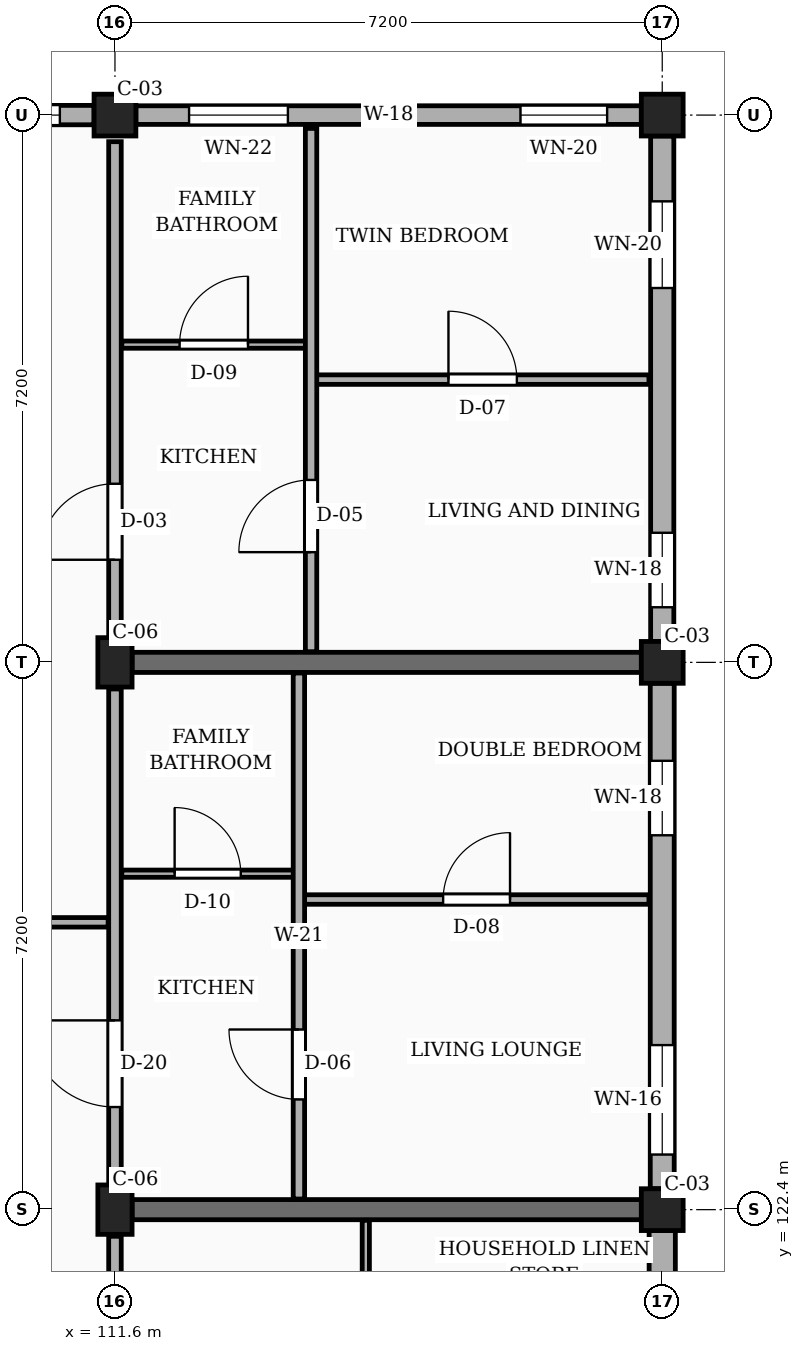
"""IFC4 building model, lengths in metres.
Left out: names, types, materials, properties, quantities, classifications, styles, units other than length and angle.
Written with IfcOpenShell. Run it as: python <this file> out.ifc"""

import sys

from ifc_helpers import new_model, si_unit, direction, frame, frame_2d, origin, origin_2d, place, context, subcontext, project, spatial, rectangle, extrude, element, fill, save


model = new_model("IFC4")
c1 = context("Model", 3, precision=1e-05, world=origin(), true_north=direction((0.0, 1.0)))
c2 = subcontext(c1, "Body", "Model", "MODEL_VIEW")
j1 = project(units=[si_unit("LENGTHUNIT", "METRE"), si_unit("PLANEANGLEUNIT", "RADIAN")], contexts=[c1])
p1 = place(None, origin())
s1 = spatial("IfcSite", under=j1, at=p1, CompositionType="ELEMENT")
p2 = place(p1, origin())
s2 = spatial("IfcBuilding", under=s1, at=p2, CompositionType="ELEMENT")
p3 = place(p2, frame((0.0, 0.0, 10.8)))
s3 = spatial("IfcBuildingStorey", under=s2, at=p3, CompositionType="ELEMENT", Elevation=10.8)
for number, where, z_axis, x_axis in (
    (1, (111.6, 122.4, 0.0), (0.0, 0.0, 1.0), (1.0, 0.0, 0.0)),
    (2, (111.6, 129.6, 0.0), (0.0, 0.0, 1.0), (1.0, 0.0, 0.0)),
):
    element("IfcColumn", number, at=place(p3, frame(where, z_axis=z_axis, x_axis=x_axis)), inside=s3, PredefinedType="COLUMN", context=c2, shape_type="SweptSolid", body=[
        extrude(rectangle(XDim=0.45, YDim=0.65, at=origin_2d()), origin(), (0.0, 0.0, 1.0), 3.15),
    ])
for number, where, z_axis, x_axis in (
    (3, (111.6, 136.8, 0.0), (0.0, 0.0, 1.0), (1.0, 0.0, 0.0)),
    (4, (118.8, 122.4, 0.0), (0.0, 0.0, 1.0), (1.0, 0.0, 0.0)),
    (5, (118.8, 129.6, 0.0), (0.0, 0.0, 1.0), (1.0, 0.0, 0.0)),
    (6, (118.8, 136.8, 0.0), (0.0, 0.0, 1.0), (1.0, 0.0, 0.0)),
):
    element("IfcColumn", number, at=place(p3, frame(where, z_axis=z_axis, x_axis=x_axis)), inside=s3, PredefinedType="COLUMN", context=c2, shape_type="SweptSolid", body=[
        extrude(rectangle(XDim=0.55, YDim=0.55, at=origin_2d()), origin(), (0.0, 0.0, 1.0), 3.15),
    ])
for number, where, z_axis, x_axis in (
    (7, (111.825, 122.4, 0.0), (0.0, 0.0, 1.0), (1.0, 0.0, 0.0)),
    (8, (111.825, 129.6, 0.0), (0.0, 0.0, 1.0), (1.0, 0.0, 0.0)),
):
    element("IfcWall", number, at=place(p3, frame(where, z_axis=z_axis, x_axis=x_axis)), inside=s3, PredefinedType="SOLIDWALL", context=c2, shape_type="SweptSolid", body=[
        extrude(rectangle(XDim=6.7, YDim=0.265, at=frame_2d((3.35, 0.0))), origin(), (0.0, 0.0, 1.0), 2.19),
    ])
p4 = place(p3, frame((118.8, 115.475, 0.0), z_axis=(0.0, 0.0, 1.0), x_axis=(0.0, 1.0, 0.0)))
e9 = element("IfcWall", 9, at=p4, inside=s3, PredefinedType="SOLIDWALL", context=c2, shape_type="SweptSolid", body=[
    extrude(rectangle(XDim=6.65, YDim=0.345, at=frame_2d((3.325, 0.0))), origin(), (0.0, 0.0, 1.0), 2.46),
])
p5 = place(p4, frame((0.45, 0.0, 0.78)))
e10 = element("IfcOpeningElement", 10, at=p5, cuts=e9, PredefinedType="OPENING", context=c2, shape_type="SweptSolid", body=[
    extrude(rectangle(XDim=1.28, YDim=1.26, at=frame_2d((0.64, 0.63))), frame((0.0, 0.183, 0.0), z_axis=(0.0, -1.0, 0.0), x_axis=(1.0, 0.0, 0.0)), (0.0, 0.0, 1.0), 0.365),
])
p6 = place(p4, frame((4.65, 0.0, 0.78)))
e11 = element("IfcOpeningElement", 11, at=p6, cuts=e9, PredefinedType="OPENING", context=c2, shape_type="SweptSolid", body=[
    extrude(rectangle(XDim=1.44, YDim=1.26, at=frame_2d((0.72, 0.63))), frame((0.0, 0.183, 0.0), z_axis=(0.0, -1.0, 0.0), x_axis=(1.0, 0.0, 0.0)), (0.0, 0.0, 1.0), 0.365),
])
p7 = place(p3, frame((118.8, 122.675, 0.0), z_axis=(0.0, 0.0, 1.0), x_axis=(0.0, 1.0, 0.0)))
e12 = element("IfcWall", 12, at=p7, inside=s3, PredefinedType="SOLIDWALL", context=c2, shape_type="SweptSolid", body=[
    extrude(rectangle(XDim=6.65, YDim=0.315, at=frame_2d((3.325, 0.0))), origin(), (0.0, 0.0, 1.0), 2.46),
])
p8 = place(p7, frame((0.45, 0.0, 0.78)))
e13 = element("IfcOpeningElement", 13, at=p8, cuts=e12, PredefinedType="OPENING", context=c2, shape_type="SweptSolid", body=[
    extrude(rectangle(XDim=1.44, YDim=1.26, at=frame_2d((0.72, 0.63))), frame((0.0, 0.167, 0.0), z_axis=(0.0, -1.0, 0.0), x_axis=(1.0, 0.0, 0.0)), (0.0, 0.0, 1.0), 0.335),
])
p9 = place(p7, frame((4.65, 0.0, 0.78)))
e14 = element("IfcOpeningElement", 14, at=p9, cuts=e12, PredefinedType="OPENING", context=c2, shape_type="SweptSolid", body=[
    extrude(rectangle(XDim=0.98, YDim=1.36, at=frame_2d((0.49, 0.68))), frame((0.0, 0.167, 0.0), z_axis=(0.0, -1.0, 0.0), x_axis=(1.0, 0.0, 0.0)), (0.0, 0.0, 1.0), 0.335),
])
p10 = place(p3, frame((118.8, 129.875, 0.0), z_axis=(0.0, 0.0, 1.0), x_axis=(0.0, 1.0, 0.0)))
e15 = element("IfcWall", 15, at=p10, inside=s3, PredefinedType="SOLIDWALL", context=c2, shape_type="SweptSolid", body=[
    extrude(rectangle(XDim=6.65, YDim=0.305, at=frame_2d((3.325, 0.0))), origin(), (0.0, 0.0, 1.0), 2.46),
])
p11 = place(p10, frame((0.45, 0.0, 0.78)))
e16 = element("IfcOpeningElement", 16, at=p11, cuts=e15, PredefinedType="OPENING", context=c2, shape_type="SweptSolid", body=[
    extrude(rectangle(XDim=0.98, YDim=1.36, at=frame_2d((0.49, 0.68))), frame((0.0, 0.163, 0.0), z_axis=(0.0, -1.0, 0.0), x_axis=(1.0, 0.0, 0.0)), (0.0, 0.0, 1.0), 0.325),
])
p12 = place(p10, frame((4.65, 0.0, 0.78)))
e17 = element("IfcOpeningElement", 17, at=p12, cuts=e15, PredefinedType="OPENING", context=c2, shape_type="SweptSolid", body=[
    extrude(rectangle(XDim=1.14, YDim=1.36, at=frame_2d((0.57, 0.68))), frame((0.0, 0.163, 0.0), z_axis=(0.0, -1.0, 0.0), x_axis=(1.0, 0.0, 0.0)), (0.0, 0.0, 1.0), 0.325),
])
p13 = place(p3, frame((118.525, 136.8, 0.0), z_axis=(0.0, 0.0, 1.0), x_axis=(-1.0, 0.0, 0.0)))
e18 = element("IfcWall", 18, at=p13, inside=s3, PredefinedType="SOLIDWALL", context=c2, shape_type="SweptSolid", body=[
    extrude(rectangle(XDim=6.65, YDim=0.245, at=frame_2d((3.325, 0.0))), origin(), (0.0, 0.0, 1.0), 2.46),
])
p14 = place(p13, frame((0.45, 0.0, 0.78)))
e19 = element("IfcOpeningElement", 19, at=p14, cuts=e18, PredefinedType="OPENING", context=c2, shape_type="SweptSolid", body=[
    extrude(rectangle(XDim=1.14, YDim=1.36, at=frame_2d((0.57, 0.68))), frame((0.0, 0.133, 0.0), z_axis=(0.0, -1.0, 0.0), x_axis=(1.0, 0.0, 0.0)), (0.0, 0.0, 1.0), 0.265),
])
p15 = place(p13, frame((4.65, 0.0, 0.78)))
e20 = element("IfcOpeningElement", 20, at=p15, cuts=e18, PredefinedType="OPENING", context=c2, shape_type="SweptSolid", body=[
    extrude(rectangle(XDim=1.3, YDim=1.36, at=frame_2d((0.65, 0.68))), frame((0.0, 0.133, 0.0), z_axis=(0.0, -1.0, 0.0), x_axis=(1.0, 0.0, 0.0)), (0.0, 0.0, 1.0), 0.265),
])
p16 = place(p3, frame((111.325, 136.8, 0.0), z_axis=(0.0, 0.0, 1.0), x_axis=(-1.0, 0.0, 0.0)))
e21 = element("IfcWall", 21, at=p16, inside=s3, PredefinedType="SOLIDWALL", context=c2, shape_type="SweptSolid", body=[
    extrude(rectangle(XDim=6.65, YDim=0.255, at=frame_2d((3.325, 0.0))), origin(), (0.0, 0.0, 1.0), 2.46),
])
p17 = place(p16, frame((0.45, 0.0, 0.78)))
e22 = element("IfcOpeningElement", 22, at=p17, cuts=e21, PredefinedType="OPENING", context=c2, shape_type="SweptSolid", body=[
    extrude(rectangle(XDim=1.3, YDim=1.36, at=frame_2d((0.65, 0.68))), frame((0.0, 0.137, 0.0), z_axis=(0.0, -1.0, 0.0), x_axis=(1.0, 0.0, 0.0)), (0.0, 0.0, 1.0), 0.275),
])
p18 = place(p16, frame((4.65, 0.0, 0.78)))
e23 = element("IfcOpeningElement", 23, at=p18, cuts=e21, PredefinedType="OPENING", context=c2, shape_type="SweptSolid", body=[
    extrude(rectangle(XDim=1.46, YDim=1.36, at=frame_2d((0.73, 0.68))), frame((0.0, 0.137, 0.0), z_axis=(0.0, -1.0, 0.0), x_axis=(1.0, 0.0, 0.0)), (0.0, 0.0, 1.0), 0.275),
])
p19 = place(p3, frame((111.6, 115.55, 0.0), z_axis=(0.0, 0.0, 1.0), x_axis=(0.0, 1.0, 0.0)))
e24 = element("IfcWall", 24, at=p19, inside=s3, PredefinedType="PARTITIONING", context=c2, shape_type="SweptSolid", body=[
    extrude(rectangle(XDim=6.5, YDim=0.165, at=frame_2d((3.25, 0.0))), origin(), (0.0, 0.0, 1.0), 2.24),
])
p20 = place(p19, frame((1.1, 0.0, 0.0)))
e25 = element("IfcOpeningElement", 25, at=p20, cuts=e24, PredefinedType="OPENING", context=c2, shape_type="SweptSolid", body=[
    extrude(rectangle(XDim=0.94, YDim=2.12, at=frame_2d((0.47, 1.06))), frame((0.0, 0.093, 0.0), z_axis=(0.0, -1.0, 0.0), x_axis=(1.0, 0.0, 0.0)), (0.0, 0.0, 1.0), 0.185),
])
p21 = place(p3, frame((111.6, 122.75, 0.0), z_axis=(0.0, 0.0, 1.0), x_axis=(0.0, 1.0, 0.0)))
e26 = element("IfcWall", 26, at=p21, inside=s3, PredefinedType="PARTITIONING", context=c2, shape_type="SweptSolid", body=[
    extrude(rectangle(XDim=6.5, YDim=0.165, at=frame_2d((3.25, 0.0))), origin(), (0.0, 0.0, 1.0), 2.24),
])
p22 = place(p21, frame((1.0, 0.0, 0.0)))
e27 = element("IfcOpeningElement", 27, at=p22, cuts=e26, PredefinedType="OPENING", context=c2, shape_type="SweptSolid", body=[
    extrude(rectangle(XDim=1.14, YDim=2.18, at=frame_2d((0.57, 1.09))), frame((0.0, 0.093, 0.0), z_axis=(0.0, -1.0, 0.0), x_axis=(1.0, 0.0, 0.0)), (0.0, 0.0, 1.0), 0.185),
])
p23 = place(p3, frame((111.6, 129.95, 0.0), z_axis=(0.0, 0.0, 1.0), x_axis=(0.0, 1.0, 0.0)))
e28 = element("IfcWall", 28, at=p23, inside=s3, PredefinedType="PARTITIONING", context=c2, shape_type="SweptSolid", body=[
    extrude(rectangle(XDim=6.5, YDim=0.165, at=frame_2d((3.25, 0.0))), origin(), (0.0, 0.0, 1.0), 2.24),
])
p24 = place(p23, frame((1.0, 0.0, 0.0)))
e29 = element("IfcOpeningElement", 29, at=p24, cuts=e28, PredefinedType="OPENING", context=c2, shape_type="SweptSolid", body=[
    extrude(rectangle(XDim=1.0, YDim=2.15, at=frame_2d((0.5, 1.075))), frame((0.0, 0.093, 0.0), z_axis=(0.0, -1.0, 0.0), x_axis=(1.0, 0.0, 0.0)), (0.0, 0.0, 1.0), 0.185),
])
p25 = place(p3, frame((114.9, 119.07, 0.0), z_axis=(0.0, 0.0, 1.0), x_axis=(0.0, 1.0, 0.0)))
e30 = element("IfcWall", 30, at=p25, inside=s3, PredefinedType="PARTITIONING", context=c2, shape_type="SweptSolid", body=[
    extrude(rectangle(XDim=3.19, YDim=0.095, at=frame_2d((1.595, 0.0))), origin(), (0.0, 0.0, 1.0), 2.325),
])
p26 = place(p3, frame((104.49, 126.18, 0.0), z_axis=(0.0, 0.0, 1.0), x_axis=(1.0, 0.0, 0.0)))
e31 = element("IfcWall", 31, at=p26, inside=s3, PredefinedType="PARTITIONING", context=c2, shape_type="SweptSolid", body=[
    extrude(rectangle(XDim=7.02, YDim=0.125, at=frame_2d((3.51, 0.0))), origin(), (0.0, 0.0, 1.0), 2.325),
])
p27 = place(p26, frame((2.85, 0.0, 0.0)))
e32 = element("IfcOpeningElement", 32, at=p27, cuts=e31, PredefinedType="OPENING", context=c2, shape_type="SweptSolid", body=[
    extrude(rectangle(XDim=1.02, YDim=2.15, at=frame_2d((0.51, 1.075))), frame((0.0, 0.073, 0.0), z_axis=(0.0, -1.0, 0.0), x_axis=(1.0, 0.0, 0.0)), (0.0, 0.0, 1.0), 0.145),
])
p28 = place(p3, frame((114.09, 126.48, 0.0), z_axis=(0.0, 0.0, 1.0), x_axis=(1.0, 0.0, 0.0)))
e33 = element("IfcWall", 33, at=p28, inside=s3, PredefinedType="PARTITIONING", context=c2, shape_type="SweptSolid", body=[
    extrude(rectangle(XDim=4.535, YDim=0.125, at=frame_2d((2.268, 0.0))), origin(), (0.0, 0.0, 1.0), 2.325),
])
p29 = place(p28, frame((1.827, 0.0, 0.0)))
e34 = element("IfcOpeningElement", 34, at=p29, cuts=e33, PredefinedType="OPENING", context=c2, shape_type="SweptSolid", body=[
    extrude(rectangle(XDim=0.88, YDim=2.08, at=frame_2d((0.44, 1.04))), frame((0.0, 0.073, 0.0), z_axis=(0.0, -1.0, 0.0), x_axis=(1.0, 0.0, 0.0)), (0.0, 0.0, 1.0), 0.145),
])
p30 = place(p3, frame((111.69, 126.82, 0.0), z_axis=(0.0, 0.0, 1.0), x_axis=(1.0, 0.0, 0.0)))
e35 = element("IfcWall", 35, at=p30, inside=s3, PredefinedType="PARTITIONING", context=c2, shape_type="SweptSolid", body=[
    extrude(rectangle(XDim=2.26, YDim=0.095, at=frame_2d((1.13, 0.0))), origin(), (0.0, 0.0, 1.0), 2.325),
])
p31 = place(p30, frame((0.695, 0.0, 0.0)))
e36 = element("IfcOpeningElement", 36, at=p31, cuts=e35, PredefinedType="OPENING", context=c2, shape_type="SweptSolid", body=[
    extrude(rectangle(XDim=0.87, YDim=2.05, at=frame_2d((0.435, 1.025))), frame((0.0, 0.058, 0.0), z_axis=(0.0, -1.0, 0.0), x_axis=(1.0, 0.0, 0.0)), (0.0, 0.0, 1.0), 0.115),
])
p32 = place(p3, frame((114.02, 122.54, 0.0), z_axis=(0.0, 0.0, 1.0), x_axis=(0.0, 1.0, 0.0)))
e37 = element("IfcWall", 37, at=p32, inside=s3, PredefinedType="PARTITIONING", context=c2, shape_type="SweptSolid", body=[
    extrude(rectangle(XDim=6.92, YDim=0.15, at=frame_2d((3.46, 0.0))), origin(), (0.0, 0.0, 1.0), 2.325),
])
p33 = place(p32, frame((1.31, 0.0, 0.0)))
e38 = element("IfcOpeningElement", 38, at=p33, cuts=e37, PredefinedType="OPENING", context=c2, shape_type="SweptSolid", body=[
    extrude(rectangle(XDim=0.92, YDim=2.1, at=frame_2d((0.46, 1.05))), frame((0.0, 0.085, 0.0), z_axis=(0.0, -1.0, 0.0), x_axis=(1.0, 0.0, 0.0)), (0.0, 0.0, 1.0), 0.17),
])
p34 = place(p3, frame((114.25, 133.32, 0.0), z_axis=(0.0, 0.0, 1.0), x_axis=(1.0, 0.0, 0.0)))
e39 = element("IfcWall", 39, at=p34, inside=s3, PredefinedType="PARTITIONING", context=c2, shape_type="SweptSolid", body=[
    extrude(rectangle(XDim=4.375, YDim=0.125, at=frame_2d((2.188, 0.0))), origin(), (0.0, 0.0, 1.0), 2.325),
])
p35 = place(p34, frame((1.738, 0.0, 0.0)))
e40 = element("IfcOpeningElement", 40, at=p35, cuts=e39, PredefinedType="OPENING", context=c2, shape_type="SweptSolid", body=[
    extrude(rectangle(XDim=0.9, YDim=2.1, at=frame_2d((0.45, 1.05))), frame((0.0, 0.073, 0.0), z_axis=(0.0, -1.0, 0.0), x_axis=(1.0, 0.0, 0.0)), (0.0, 0.0, 1.0), 0.145),
])
p36 = place(p3, frame((111.69, 133.78, 0.0), z_axis=(0.0, 0.0, 1.0), x_axis=(1.0, 0.0, 0.0)))
e41 = element("IfcWall", 41, at=p36, inside=s3, PredefinedType="PARTITIONING", context=c2, shape_type="SweptSolid", body=[
    extrude(rectangle(XDim=2.42, YDim=0.095, at=frame_2d((1.21, 0.0))), origin(), (0.0, 0.0, 1.0), 2.325),
])
p37 = place(p36, frame((0.76, 0.0, 0.0)))
e42 = element("IfcOpeningElement", 42, at=p37, cuts=e41, PredefinedType="OPENING", context=c2, shape_type="SweptSolid", body=[
    extrude(rectangle(XDim=0.9, YDim=2.05, at=frame_2d((0.45, 1.025))), frame((0.0, 0.058, 0.0), z_axis=(0.0, -1.0, 0.0), x_axis=(1.0, 0.0, 0.0)), (0.0, 0.0, 1.0), 0.115),
])
p38 = place(p3, frame((114.18, 129.74, 0.0), z_axis=(0.0, 0.0, 1.0), x_axis=(0.0, 1.0, 0.0)))
e43 = element("IfcWall", 43, at=p38, inside=s3, PredefinedType="PARTITIONING", context=c2, shape_type="SweptSolid", body=[
    extrude(rectangle(XDim=6.885, YDim=0.15, at=frame_2d((3.442, 0.0))), origin(), (0.0, 0.0, 1.0), 2.325),
])
p39 = place(p38, frame((1.31, 0.0, 0.0)))
e44 = element("IfcOpeningElement", 44, at=p39, cuts=e43, PredefinedType="OPENING", context=c2, shape_type="SweptSolid", body=[
    extrude(rectangle(XDim=0.95, YDim=2.1, at=frame_2d((0.475, 1.05))), frame((0.0, 0.085, 0.0), z_axis=(0.0, -1.0, 0.0), x_axis=(1.0, 0.0, 0.0)), (0.0, 0.0, 1.0), 0.17),
])
p40 = place(p8, origin())
e45 = element("IfcWindow", 45, at=p40, inside=s3, PartitioningType="SINGLE_PANEL", PredefinedType="WINDOW", context=c2, shape_type="SweptSolid", body=[
    extrude(rectangle(XDim=1.44, YDim=1.26, at=frame_2d((0.72, 0.63))), frame((0.0, 0.03, 0.0), z_axis=(0.0, -1.0, 0.0), x_axis=(1.0, 0.0, 0.0)), (0.0, 0.0, 1.0), 0.06),
])
fill(e13, e45)
p41 = place(p9, origin())
e46 = element("IfcWindow", 46, at=p41, inside=s3, PartitioningType="SINGLE_PANEL", PredefinedType="WINDOW", context=c2, shape_type="SweptSolid", body=[
    extrude(rectangle(XDim=0.98, YDim=1.36, at=frame_2d((0.49, 0.68))), frame((0.0, 0.03, 0.0), z_axis=(0.0, -1.0, 0.0), x_axis=(1.0, 0.0, 0.0)), (0.0, 0.0, 1.0), 0.06),
])
fill(e14, e46)
p42 = place(p11, origin())
e47 = element("IfcWindow", 47, at=p42, inside=s3, PartitioningType="SINGLE_PANEL", PredefinedType="WINDOW", context=c2, shape_type="SweptSolid", body=[
    extrude(rectangle(XDim=0.98, YDim=1.36, at=frame_2d((0.49, 0.68))), frame((0.0, 0.03, 0.0), z_axis=(0.0, -1.0, 0.0), x_axis=(1.0, 0.0, 0.0)), (0.0, 0.0, 1.0), 0.06),
])
fill(e16, e47)
p43 = place(p12, origin())
e48 = element("IfcWindow", 48, at=p43, inside=s3, PartitioningType="SINGLE_PANEL", PredefinedType="WINDOW", context=c2, shape_type="SweptSolid", body=[
    extrude(rectangle(XDim=1.14, YDim=1.36, at=frame_2d((0.57, 0.68))), frame((0.0, 0.03, 0.0), z_axis=(0.0, -1.0, 0.0), x_axis=(1.0, 0.0, 0.0)), (0.0, 0.0, 1.0), 0.06),
])
fill(e17, e48)
p44 = place(p14, origin())
e49 = element("IfcWindow", 49, at=p44, inside=s3, PartitioningType="SINGLE_PANEL", PredefinedType="WINDOW", context=c2, shape_type="SweptSolid", body=[
    extrude(rectangle(XDim=1.14, YDim=1.36, at=frame_2d((0.57, 0.68))), frame((0.0, 0.03, 0.0), z_axis=(0.0, -1.0, 0.0), x_axis=(1.0, 0.0, 0.0)), (0.0, 0.0, 1.0), 0.06),
])
fill(e19, e49)
p45 = place(p15, origin())
e50 = element("IfcWindow", 50, at=p45, inside=s3, PartitioningType="SINGLE_PANEL", PredefinedType="WINDOW", context=c2, shape_type="SweptSolid", body=[
    extrude(rectangle(XDim=1.3, YDim=1.36, at=frame_2d((0.65, 0.68))), frame((0.0, 0.03, 0.0), z_axis=(0.0, -1.0, 0.0), x_axis=(1.0, 0.0, 0.0)), (0.0, 0.0, 1.0), 0.06),
])
fill(e20, e50)
p46 = place(p17, origin())
e51 = element("IfcWindow", 51, at=p46, inside=s3, PartitioningType="SINGLE_PANEL", PredefinedType="WINDOW", context=c2, shape_type="SweptSolid", body=[
    extrude(rectangle(XDim=1.3, YDim=1.36, at=frame_2d((0.65, 0.68))), frame((0.0, 0.03, 0.0), z_axis=(0.0, -1.0, 0.0), x_axis=(1.0, 0.0, 0.0)), (0.0, 0.0, 1.0), 0.06),
])
fill(e22, e51)
p47 = place(p22, origin())
e52 = element("IfcDoor", 52, at=p47, inside=s3, OperationType="SINGLE_SWING_RIGHT", PredefinedType="DOOR", context=c2, shape_type="SweptSolid", body=[
    extrude(rectangle(XDim=1.14, YDim=2.18, at=frame_2d((0.57, 1.09))), frame((0.0, 0.025, 0.0), z_axis=(0.0, -1.0, 0.0), x_axis=(1.0, 0.0, 0.0)), (0.0, 0.0, 1.0), 0.05),
])
fill(e27, e52)
p48 = place(p24, origin())
e53 = element("IfcDoor", 53, at=p48, inside=s3, OperationType="SINGLE_SWING_LEFT", PredefinedType="DOOR", context=c2, shape_type="SweptSolid", body=[
    extrude(rectangle(XDim=1.0, YDim=2.15, at=frame_2d((0.5, 1.075))), frame((0.0, 0.025, 0.0), z_axis=(0.0, -1.0, 0.0), x_axis=(1.0, 0.0, 0.0)), (0.0, 0.0, 1.0), 0.05),
])
fill(e29, e53)
p49 = place(p29, origin())
e54 = element("IfcDoor", 54, at=p49, inside=s3, OperationType="SINGLE_SWING_RIGHT", PredefinedType="DOOR", context=c2, shape_type="SweptSolid", body=[
    extrude(rectangle(XDim=0.88, YDim=2.08, at=frame_2d((0.44, 1.04))), frame((0.0, 0.025, 0.0), z_axis=(0.0, -1.0, 0.0), x_axis=(1.0, 0.0, 0.0)), (0.0, 0.0, 1.0), 0.05),
])
fill(e34, e54)
p50 = place(p31, origin())
e55 = element("IfcDoor", 55, at=p50, inside=s3, OperationType="SINGLE_SWING_LEFT", PredefinedType="DOOR", context=c2, shape_type="SweptSolid", body=[
    extrude(rectangle(XDim=0.87, YDim=2.05, at=frame_2d((0.435, 1.025))), frame((0.0, 0.025, 0.0), z_axis=(0.0, -1.0, 0.0), x_axis=(1.0, 0.0, 0.0)), (0.0, 0.0, 1.0), 0.05),
])
fill(e36, e55)
p51 = place(p33, origin())
e56 = element("IfcDoor", 56, at=p51, inside=s3, OperationType="SINGLE_SWING_RIGHT", PredefinedType="DOOR", context=c2, shape_type="SweptSolid", body=[
    extrude(rectangle(XDim=0.92, YDim=2.1, at=frame_2d((0.46, 1.05))), frame((0.0, 0.025, 0.0), z_axis=(0.0, -1.0, 0.0), x_axis=(1.0, 0.0, 0.0)), (0.0, 0.0, 1.0), 0.05),
])
fill(e38, e56)
p52 = place(p35, origin())
e57 = element("IfcDoor", 57, at=p52, inside=s3, OperationType="SINGLE_SWING_LEFT", PredefinedType="DOOR", context=c2, shape_type="SweptSolid", body=[
    extrude(rectangle(XDim=0.9, YDim=2.1, at=frame_2d((0.45, 1.05))), frame((0.0, 0.025, 0.0), z_axis=(0.0, -1.0, 0.0), x_axis=(1.0, 0.0, 0.0)), (0.0, 0.0, 1.0), 0.05),
])
fill(e40, e57)
p53 = place(p37, origin())
e58 = element("IfcDoor", 58, at=p53, inside=s3, OperationType="SINGLE_SWING_RIGHT", PredefinedType="DOOR", context=c2, shape_type="SweptSolid", body=[
    extrude(rectangle(XDim=0.9, YDim=2.05, at=frame_2d((0.45, 1.025))), frame((0.0, 0.025, 0.0), z_axis=(0.0, -1.0, 0.0), x_axis=(1.0, 0.0, 0.0)), (0.0, 0.0, 1.0), 0.05),
])
fill(e42, e58)
p54 = place(p39, origin())
e59 = element("IfcDoor", 59, at=p54, inside=s3, OperationType="SINGLE_SWING_LEFT", PredefinedType="DOOR", context=c2, shape_type="SweptSolid", body=[
    extrude(rectangle(XDim=0.95, YDim=2.1, at=frame_2d((0.475, 1.05))), frame((0.0, 0.025, 0.0), z_axis=(0.0, -1.0, 0.0), x_axis=(1.0, 0.0, 0.0)), (0.0, 0.0, 1.0), 0.05),
])
fill(e44, e59)
save(model, sys.argv[1])
